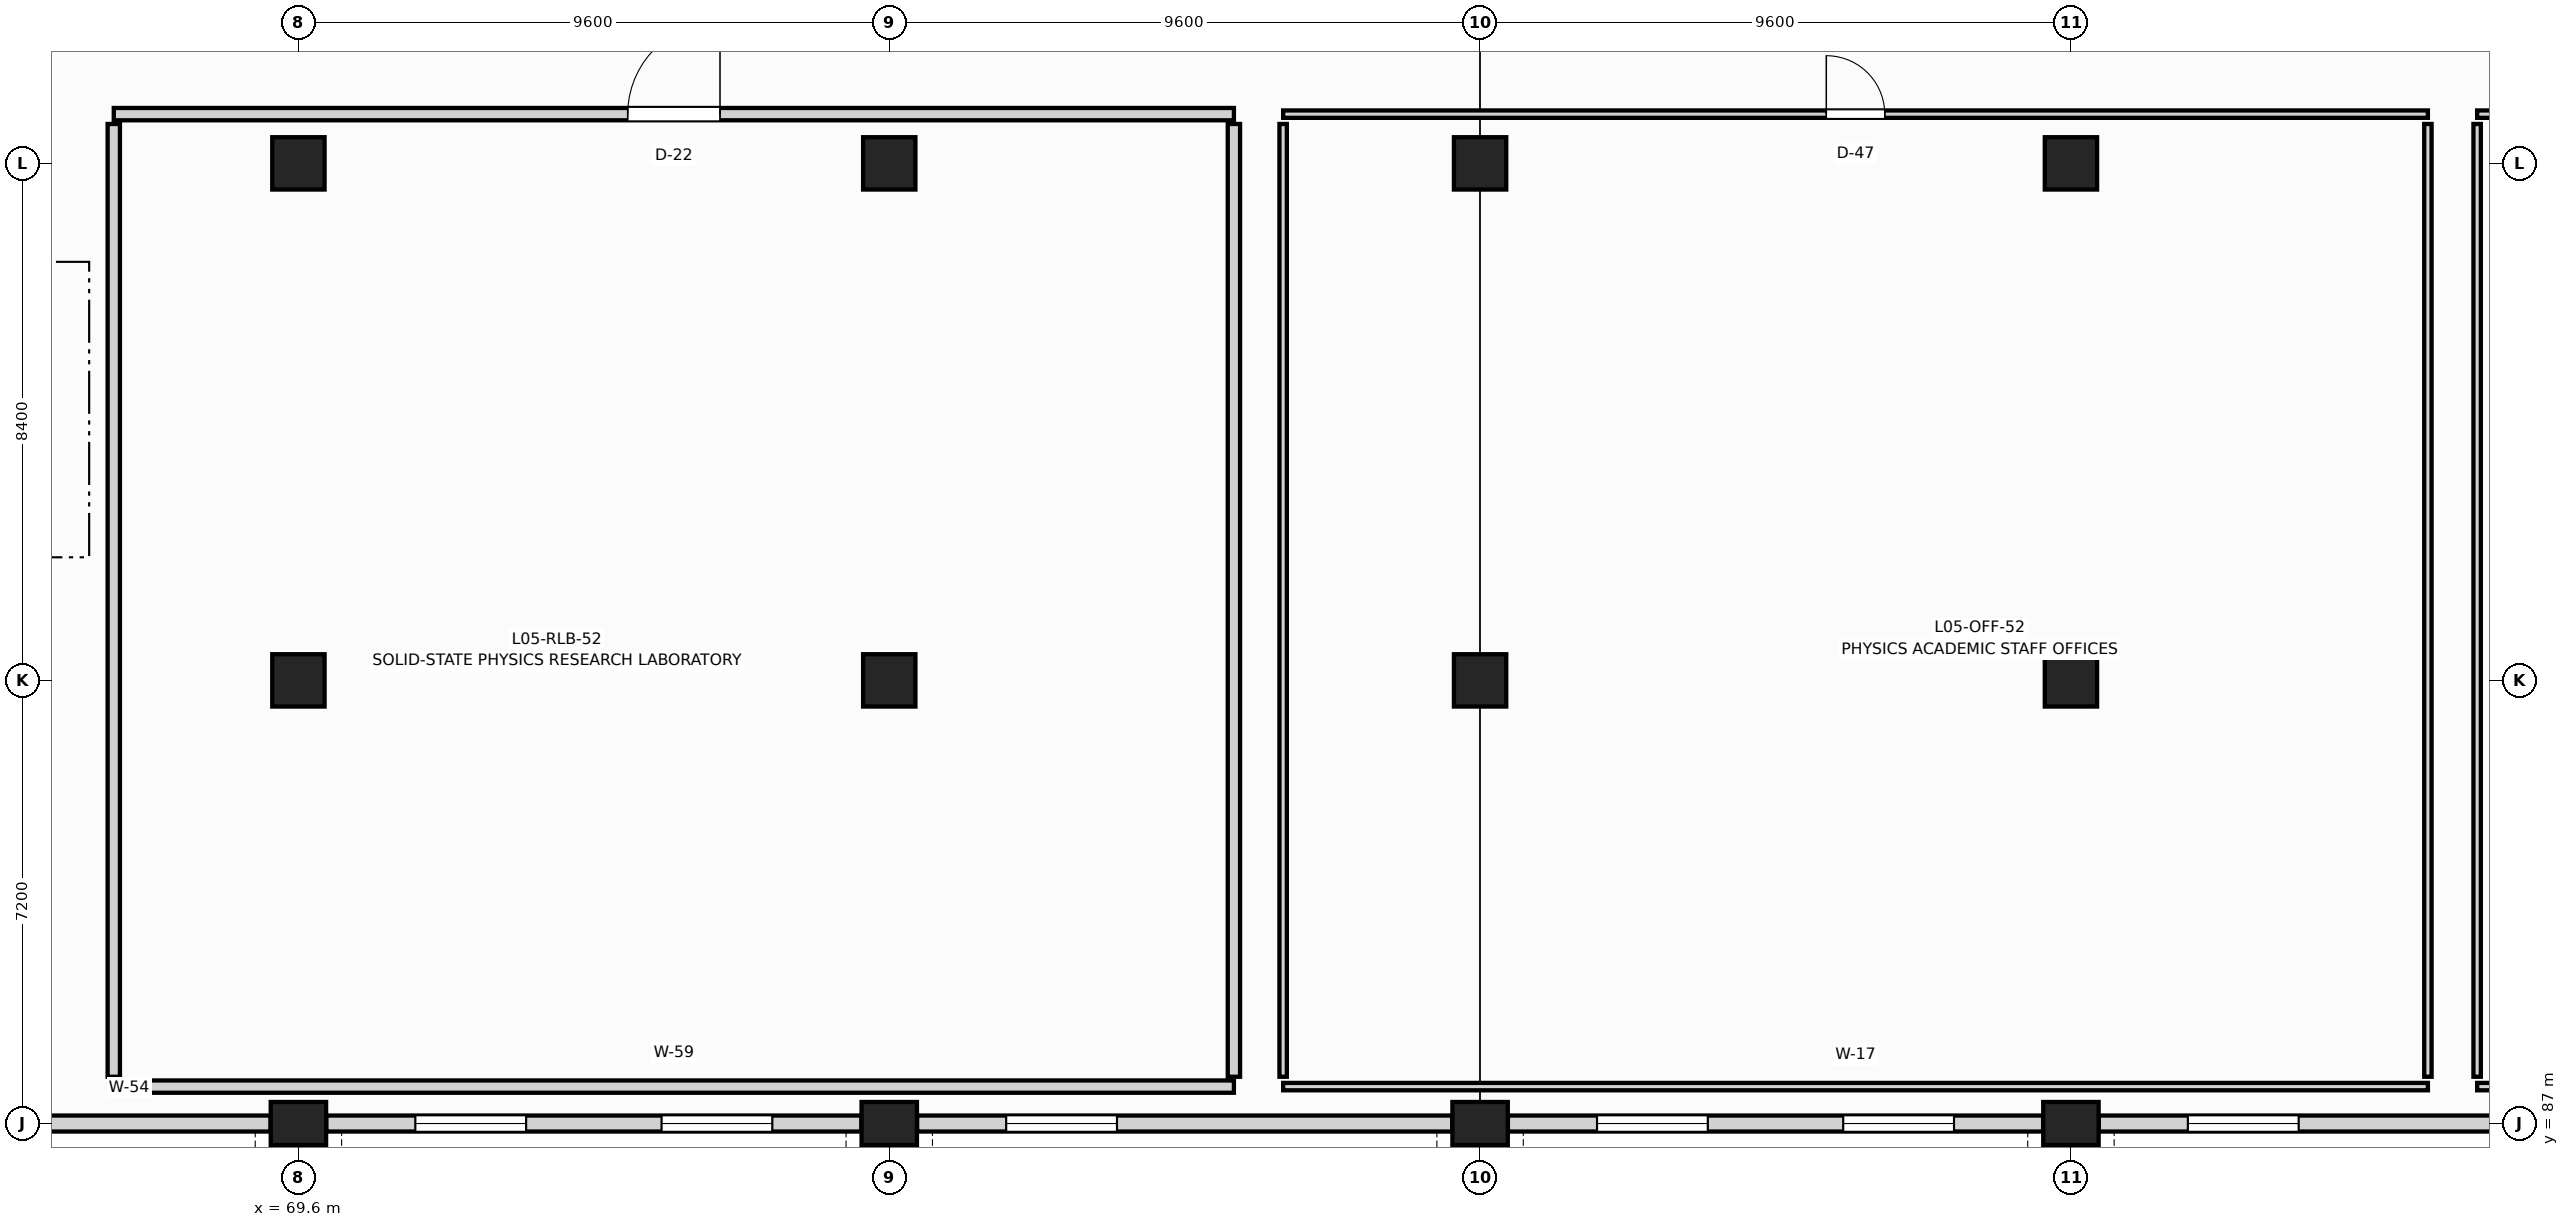
"""IFC4 building model, lengths in metres.
Left out: names, types, materials, properties, quantities, classifications, styles, units other than length and angle.
Written with IfcOpenShell. Run it as: python <this file> out.ifc"""

import sys

from ifc_helpers import new_model, si_unit, direction, frame, frame_2d, origin, origin_2d, place, context, subcontext, project, spatial, rectangle, extrude, element, fill, save


model = new_model("IFC4")
c1 = context("Model", 3, precision=1e-05, world=origin(), true_north=direction((0.0, 1.0)))
c2 = subcontext(c1, "Body", "Model", "MODEL_VIEW")
j1 = project(units=[si_unit("LENGTHUNIT", "METRE"), si_unit("PLANEANGLEUNIT", "RADIAN")], contexts=[c1])
p1 = place(None, origin())
s1 = spatial("IfcSite", under=j1, at=p1, CompositionType="ELEMENT")
p2 = place(p1, origin())
s2 = spatial("IfcBuilding", under=s1, at=p2, CompositionType="ELEMENT")
p3 = place(p2, frame((0.0, 0.0, 22.5)))
s3 = spatial("IfcBuildingStorey", under=s2, at=p3, CompositionType="ELEMENT", Elevation=22.5)
p4 = place(p3, frame((69.6, 87.0, 0.0), z_axis=(0.0, 0.0, 1.0), x_axis=(1.0, 0.0, 0.0)))
e1 = element("IfcColumn", 1, at=p4, inside=s3, PredefinedType="COLUMN", context=c2, shape_type="SweptSolid", body=[
    extrude(rectangle(XDim=0.9, YDim=0.7, at=origin_2d()), origin(), (0.0, 0.0, 1.0), 3.96),
])
for number, where, z_axis, x_axis in (
    (2, (69.6, 94.2, 0.0), (0.0, 0.0, 1.0), (1.0, 0.0, 0.0)),
    (3, (69.6, 102.6, 0.0), (0.0, 0.0, 1.0), (1.0, 0.0, 0.0)),
):
    element("IfcColumn", number, at=place(p3, frame(where, z_axis=z_axis, x_axis=x_axis)), inside=s3, PredefinedType="COLUMN", context=c2, shape_type="SweptSolid", body=[
        extrude(rectangle(XDim=0.85, YDim=0.85, at=origin_2d()), origin(), (0.0, 0.0, 1.0), 3.92),
    ])
p5 = place(p3, frame((79.2, 87.0, 0.0), z_axis=(0.0, 0.0, 1.0), x_axis=(1.0, 0.0, 0.0)))
e4 = element("IfcColumn", 4, at=p5, inside=s3, PredefinedType="COLUMN", context=c2, shape_type="SweptSolid", body=[
    extrude(rectangle(XDim=0.9, YDim=0.7, at=origin_2d()), origin(), (0.0, 0.0, 1.0), 3.96),
])
for number, where, z_axis, x_axis in (
    (5, (79.2, 94.2, 0.0), (0.0, 0.0, 1.0), (1.0, 0.0, 0.0)),
    (6, (79.2, 102.6, 0.0), (0.0, 0.0, 1.0), (1.0, 0.0, 0.0)),
):
    element("IfcColumn", number, at=place(p3, frame(where, z_axis=z_axis, x_axis=x_axis)), inside=s3, PredefinedType="COLUMN", context=c2, shape_type="SweptSolid", body=[
        extrude(rectangle(XDim=0.85, YDim=0.85, at=origin_2d()), origin(), (0.0, 0.0, 1.0), 3.92),
    ])
p6 = place(p3, frame((88.8, 87.0, 0.0), z_axis=(0.0, 0.0, 1.0), x_axis=(1.0, 0.0, 0.0)))
e7 = element("IfcColumn", 7, at=p6, inside=s3, PredefinedType="COLUMN", context=c2, shape_type="SweptSolid", body=[
    extrude(rectangle(XDim=0.9, YDim=0.7, at=origin_2d()), origin(), (0.0, 0.0, 1.0), 3.96),
])
for number, where, z_axis, x_axis in (
    (8, (88.8, 94.2, 0.0), (0.0, 0.0, 1.0), (1.0, 0.0, 0.0)),
    (9, (88.8, 102.6, 0.0), (0.0, 0.0, 1.0), (1.0, 0.0, 0.0)),
):
    element("IfcColumn", number, at=place(p3, frame(where, z_axis=z_axis, x_axis=x_axis)), inside=s3, PredefinedType="COLUMN", context=c2, shape_type="SweptSolid", body=[
        extrude(rectangle(XDim=0.85, YDim=0.85, at=origin_2d()), origin(), (0.0, 0.0, 1.0), 3.92),
    ])
p7 = place(p3, frame((98.4, 87.0, 0.0), z_axis=(0.0, 0.0, 1.0), x_axis=(1.0, 0.0, 0.0)))
e10 = element("IfcColumn", 10, at=p7, inside=s3, PredefinedType="COLUMN", context=c2, shape_type="SweptSolid", body=[
    extrude(rectangle(XDim=0.9, YDim=0.7, at=origin_2d()), origin(), (0.0, 0.0, 1.0), 3.96),
])
for number, where, z_axis, x_axis in (
    (11, (98.4, 94.2, 0.0), (0.0, 0.0, 1.0), (1.0, 0.0, 0.0)),
    (12, (98.4, 102.6, 0.0), (0.0, 0.0, 1.0), (1.0, 0.0, 0.0)),
):
    element("IfcColumn", number, at=place(p3, frame(where, z_axis=z_axis, x_axis=x_axis)), inside=s3, PredefinedType="COLUMN", context=c2, shape_type="SweptSolid", body=[
        extrude(rectangle(XDim=0.85, YDim=0.85, at=origin_2d()), origin(), (0.0, 0.0, 1.0), 3.92),
    ])
p8 = place(p3, frame((60.452, 87.0, 0.0), z_axis=(0.0, 0.0, 1.0), x_axis=(1.0, 0.0, 0.0)))
e13 = element("IfcWall", 13, at=p8, inside=s3, PredefinedType="SOLIDWALL", context=c2, shape_type="SweptSolid", body=[
    extrude(rectangle(XDim=8.696, YDim=0.26, at=frame_2d((4.348, 0.0))), origin(), (0.0, 0.0, 1.0), 3.08),
])
p9 = place(p8, frame((1.448, 0.0, 0.85)))
e14 = element("IfcOpeningElement", 14, at=p9, cuts=e13, PredefinedType="OPENING", context=c2, shape_type="SweptSolid", body=[
    extrude(rectangle(XDim=1.8, YDim=1.9, at=frame_2d((0.9, 0.95))), frame((0.0, 0.14, 0.0), z_axis=(0.0, -1.0, 0.0), x_axis=(1.0, 0.0, 0.0)), (0.0, 0.0, 1.0), 0.28),
])
p10 = place(p3, frame((70.052, 87.0, 0.0), z_axis=(0.0, 0.0, 1.0), x_axis=(1.0, 0.0, 0.0)))
e15 = element("IfcWall", 15, at=p10, inside=s3, PredefinedType="SOLIDWALL", context=c2, shape_type="SweptSolid", body=[
    extrude(rectangle(XDim=8.696, YDim=0.26, at=frame_2d((4.348, 0.0))), origin(), (0.0, 0.0, 1.0), 3.08),
])
p11 = place(p10, frame((1.448, 0.0, 0.85)))
e16 = element("IfcOpeningElement", 16, at=p11, cuts=e15, PredefinedType="OPENING", context=c2, shape_type="SweptSolid", body=[
    extrude(rectangle(XDim=1.8, YDim=1.9, at=frame_2d((0.9, 0.95))), frame((0.0, 0.14, 0.0), z_axis=(0.0, -1.0, 0.0), x_axis=(1.0, 0.0, 0.0)), (0.0, 0.0, 1.0), 0.28),
])
p12 = place(p10, frame((5.448, 0.0, 0.85)))
e17 = element("IfcOpeningElement", 17, at=p12, cuts=e15, PredefinedType="OPENING", context=c2, shape_type="SweptSolid", body=[
    extrude(rectangle(XDim=1.8, YDim=1.9, at=frame_2d((0.9, 0.95))), frame((0.0, 0.14, 0.0), z_axis=(0.0, -1.0, 0.0), x_axis=(1.0, 0.0, 0.0)), (0.0, 0.0, 1.0), 0.28),
])
p13 = place(p3, frame((79.652, 87.0, 0.0), z_axis=(0.0, 0.0, 1.0), x_axis=(1.0, 0.0, 0.0)))
e18 = element("IfcWall", 18, at=p13, inside=s3, PredefinedType="SOLIDWALL", context=c2, shape_type="SweptSolid", body=[
    extrude(rectangle(XDim=8.696, YDim=0.26, at=frame_2d((4.348, 0.0))), origin(), (0.0, 0.0, 1.0), 3.08),
])
p14 = place(p13, frame((1.448, 0.0, 0.85)))
e19 = element("IfcOpeningElement", 19, at=p14, cuts=e18, PredefinedType="OPENING", context=c2, shape_type="SweptSolid", body=[
    extrude(rectangle(XDim=1.8, YDim=1.9, at=frame_2d((0.9, 0.95))), frame((0.0, 0.14, 0.0), z_axis=(0.0, -1.0, 0.0), x_axis=(1.0, 0.0, 0.0)), (0.0, 0.0, 1.0), 0.28),
])
p15 = place(p3, frame((89.252, 87.0, 0.0), z_axis=(0.0, 0.0, 1.0), x_axis=(1.0, 0.0, 0.0)))
e20 = element("IfcWall", 20, at=p15, inside=s3, PredefinedType="SOLIDWALL", context=c2, shape_type="SweptSolid", body=[
    extrude(rectangle(XDim=8.696, YDim=0.26, at=frame_2d((4.348, 0.0))), origin(), (0.0, 0.0, 1.0), 3.08),
])
p16 = place(p15, frame((1.448, 0.0, 0.85)))
e21 = element("IfcOpeningElement", 21, at=p16, cuts=e20, PredefinedType="OPENING", context=c2, shape_type="SweptSolid", body=[
    extrude(rectangle(XDim=1.8, YDim=1.9, at=frame_2d((0.9, 0.95))), frame((0.0, 0.14, 0.0), z_axis=(0.0, -1.0, 0.0), x_axis=(1.0, 0.0, 0.0)), (0.0, 0.0, 1.0), 0.28),
])
p17 = place(p15, frame((5.448, 0.0, 0.85)))
e22 = element("IfcOpeningElement", 22, at=p17, cuts=e20, PredefinedType="OPENING", context=c2, shape_type="SweptSolid", body=[
    extrude(rectangle(XDim=1.8, YDim=1.9, at=frame_2d((0.9, 0.95))), frame((0.0, 0.14, 0.0), z_axis=(0.0, -1.0, 0.0), x_axis=(1.0, 0.0, 0.0)), (0.0, 0.0, 1.0), 0.28),
])
p18 = place(p3, frame((98.852, 87.0, 0.0), z_axis=(0.0, 0.0, 1.0), x_axis=(1.0, 0.0, 0.0)))
e23 = element("IfcWall", 23, at=p18, inside=s3, PredefinedType="SOLIDWALL", context=c2, shape_type="SweptSolid", body=[
    extrude(rectangle(XDim=8.696, YDim=0.26, at=frame_2d((4.348, 0.0))), origin(), (0.0, 0.0, 1.0), 3.08),
])
p19 = place(p18, frame((1.448, 0.0, 0.85)))
e24 = element("IfcOpeningElement", 24, at=p19, cuts=e23, PredefinedType="OPENING", context=c2, shape_type="SweptSolid", body=[
    extrude(rectangle(XDim=1.8, YDim=1.9, at=frame_2d((0.9, 0.95))), frame((0.0, 0.14, 0.0), z_axis=(0.0, -1.0, 0.0), x_axis=(1.0, 0.0, 0.0)), (0.0, 0.0, 1.0), 0.28),
])
p20 = place(p3, frame((66.6, 87.6, 0.0), z_axis=(0.0, 0.0, 1.0), x_axis=(1.0, 0.0, 0.0)))
e25 = element("IfcWall", 25, at=p20, inside=s3, PredefinedType="PARTITIONING", context=c2, shape_type="SweptSolid", body=[
    extrude(rectangle(XDim=18.2, YDim=0.2, at=frame_2d((9.1, 0.0))), origin(), (0.0, 0.0, 1.0), 3.15),
])
p21 = place(p3, frame((66.6, 103.4, 0.0), z_axis=(0.0, 0.0, 1.0), x_axis=(1.0, 0.0, 0.0)))
e26 = element("IfcWall", 26, at=p21, inside=s3, PredefinedType="PARTITIONING", context=c2, shape_type="SweptSolid", body=[
    extrude(rectangle(XDim=18.2, YDim=0.2, at=frame_2d((9.1, 0.0))), origin(), (0.0, 0.0, 1.0), 3.15),
])
p22 = place(p21, frame((8.35, 0.0, 0.0)))
e27 = element("IfcOpeningElement", 27, at=p22, cuts=e26, PredefinedType="OPENING", context=c2, shape_type="SweptSolid", body=[
    extrude(rectangle(XDim=1.5, YDim=2.2, at=frame_2d((0.75, 1.1))), frame((0.0, 0.11, 0.0), z_axis=(0.0, -1.0, 0.0), x_axis=(1.0, 0.0, 0.0)), (0.0, 0.0, 1.0), 0.22),
])
for number, where, z_axis, x_axis in (
    (28, (66.6, 87.76, 0.0), (0.0, 0.0, 1.0), (0.0, 1.0, 0.0)),
    (29, (84.8, 87.76, 0.0), (0.0, 0.0, 1.0), (0.0, 1.0, 0.0)),
):
    element("IfcWall", number, at=place(p3, frame(where, z_axis=z_axis, x_axis=x_axis)), inside=s3, PredefinedType="PARTITIONING", context=c2, shape_type="SweptSolid", body=[
        extrude(rectangle(XDim=15.48, YDim=0.2, at=frame_2d((7.74, 0.0))), origin(), (0.0, 0.0, 1.0), 3.15),
    ])
p23 = place(p3, frame((85.6, 87.6, 0.0), z_axis=(0.0, 0.0, 1.0), x_axis=(1.0, 0.0, 0.0)))
e30 = element("IfcWall", 30, at=p23, inside=s3, PredefinedType="PARTITIONING", context=c2, shape_type="SweptSolid", body=[
    extrude(rectangle(XDim=18.6, YDim=0.12, at=frame_2d((9.3, 0.0))), origin(), (0.0, 0.0, 1.0), 3.15),
])
p24 = place(p3, frame((85.6, 103.4, 0.0), z_axis=(0.0, 0.0, 1.0), x_axis=(1.0, 0.0, 0.0)))
e31 = element("IfcWall", 31, at=p24, inside=s3, PredefinedType="PARTITIONING", context=c2, shape_type="SweptSolid", body=[
    extrude(rectangle(XDim=18.6, YDim=0.12, at=frame_2d((9.3, 0.0))), origin(), (0.0, 0.0, 1.0), 3.15),
])
p25 = place(p24, frame((8.825, 0.0, 0.0)))
e32 = element("IfcOpeningElement", 32, at=p25, cuts=e31, PredefinedType="OPENING", context=c2, shape_type="SweptSolid", body=[
    extrude(rectangle(XDim=0.95, YDim=2.15, at=frame_2d((0.475, 1.075))), frame((0.0, 0.07, 0.0), z_axis=(0.0, -1.0, 0.0), x_axis=(1.0, 0.0, 0.0)), (0.0, 0.0, 1.0), 0.14),
])
for number, where, z_axis, x_axis in (
    (33, (85.6, 87.76, 0.0), (0.0, 0.0, 1.0), (0.0, 1.0, 0.0)),
    (34, (104.2, 87.76, 0.0), (0.0, 0.0, 1.0), (0.0, 1.0, 0.0)),
):
    element("IfcWall", number, at=place(p3, frame(where, z_axis=z_axis, x_axis=x_axis)), inside=s3, PredefinedType="PARTITIONING", context=c2, shape_type="SweptSolid", body=[
        extrude(rectangle(XDim=15.48, YDim=0.12, at=frame_2d((7.74, 0.0))), origin(), (0.0, 0.0, 1.0), 3.15),
    ])
p26 = place(p3, frame((105.0, 87.6, 0.0), z_axis=(0.0, 0.0, 1.0), x_axis=(1.0, 0.0, 0.0)))
e35 = element("IfcWall", 35, at=p26, inside=s3, PredefinedType="PARTITIONING", context=c2, shape_type="SweptSolid", body=[
    extrude(rectangle(XDim=11.8, YDim=0.12, at=frame_2d((5.9, 0.0))), origin(), (0.0, 0.0, 1.0), 3.15),
])
p27 = place(p3, frame((105.0, 103.4, 0.0), z_axis=(0.0, 0.0, 1.0), x_axis=(1.0, 0.0, 0.0)))
e36 = element("IfcWall", 36, at=p27, inside=s3, PredefinedType="PARTITIONING", context=c2, shape_type="SweptSolid", body=[
    extrude(rectangle(XDim=11.8, YDim=0.12, at=frame_2d((5.9, 0.0))), origin(), (0.0, 0.0, 1.0), 3.15),
])
p28 = place(p27, frame((5.425, 0.0, 0.0)))
e37 = element("IfcOpeningElement", 37, at=p28, cuts=e36, PredefinedType="OPENING", context=c2, shape_type="SweptSolid", body=[
    extrude(rectangle(XDim=0.95, YDim=2.15, at=frame_2d((0.475, 1.075))), frame((0.0, 0.07, 0.0), z_axis=(0.0, -1.0, 0.0), x_axis=(1.0, 0.0, 0.0)), (0.0, 0.0, 1.0), 0.14),
])
p29 = place(p3, frame((105.0, 87.76, 0.0), z_axis=(0.0, 0.0, 1.0), x_axis=(0.0, 1.0, 0.0)))
e38 = element("IfcWall", 38, at=p29, inside=s3, PredefinedType="PARTITIONING", context=c2, shape_type="SweptSolid", body=[
    extrude(rectangle(XDim=15.48, YDim=0.12, at=frame_2d((7.74, 0.0))), origin(), (0.0, 0.0, 1.0), 3.15),
])
p30 = place(p11, origin())
e39 = element("IfcWindow", 39, at=p30, inside=s3, PartitioningType="SINGLE_PANEL", PredefinedType="WINDOW", context=c2, shape_type="SweptSolid", body=[
    extrude(rectangle(XDim=1.8, YDim=1.9, at=frame_2d((0.9, 0.95))), frame((0.0, 0.03, 0.0), z_axis=(0.0, -1.0, 0.0), x_axis=(1.0, 0.0, 0.0)), (0.0, 0.0, 1.0), 0.06),
])
fill(e16, e39)
p31 = place(p12, origin())
e40 = element("IfcWindow", 40, at=p31, inside=s3, PartitioningType="SINGLE_PANEL", PredefinedType="WINDOW", context=c2, shape_type="SweptSolid", body=[
    extrude(rectangle(XDim=1.8, YDim=1.9, at=frame_2d((0.9, 0.95))), frame((0.0, 0.03, 0.0), z_axis=(0.0, -1.0, 0.0), x_axis=(1.0, 0.0, 0.0)), (0.0, 0.0, 1.0), 0.06),
])
fill(e17, e40)
p32 = place(p14, origin())
e41 = element("IfcWindow", 41, at=p32, inside=s3, PartitioningType="SINGLE_PANEL", PredefinedType="WINDOW", context=c2, shape_type="SweptSolid", body=[
    extrude(rectangle(XDim=1.8, YDim=1.9, at=frame_2d((0.9, 0.95))), frame((0.0, 0.03, 0.0), z_axis=(0.0, -1.0, 0.0), x_axis=(1.0, 0.0, 0.0)), (0.0, 0.0, 1.0), 0.06),
])
fill(e19, e41)
p33 = place(p16, origin())
e42 = element("IfcWindow", 42, at=p33, inside=s3, PartitioningType="SINGLE_PANEL", PredefinedType="WINDOW", context=c2, shape_type="SweptSolid", body=[
    extrude(rectangle(XDim=1.8, YDim=1.9, at=frame_2d((0.9, 0.95))), frame((0.0, 0.03, 0.0), z_axis=(0.0, -1.0, 0.0), x_axis=(1.0, 0.0, 0.0)), (0.0, 0.0, 1.0), 0.06),
])
fill(e21, e42)
p34 = place(p17, origin())
e43 = element("IfcWindow", 43, at=p34, inside=s3, PartitioningType="SINGLE_PANEL", PredefinedType="WINDOW", context=c2, shape_type="SweptSolid", body=[
    extrude(rectangle(XDim=1.8, YDim=1.9, at=frame_2d((0.9, 0.95))), frame((0.0, 0.03, 0.0), z_axis=(0.0, -1.0, 0.0), x_axis=(1.0, 0.0, 0.0)), (0.0, 0.0, 1.0), 0.06),
])
fill(e22, e43)
p35 = place(p19, origin())
e44 = element("IfcWindow", 44, at=p35, inside=s3, PartitioningType="SINGLE_PANEL", PredefinedType="WINDOW", context=c2, shape_type="SweptSolid", body=[
    extrude(rectangle(XDim=1.8, YDim=1.9, at=frame_2d((0.9, 0.95))), frame((0.0, 0.03, 0.0), z_axis=(0.0, -1.0, 0.0), x_axis=(1.0, 0.0, 0.0)), (0.0, 0.0, 1.0), 0.06),
])
fill(e24, e44)
p36 = place(p22, origin())
e45 = element("IfcDoor", 45, at=p36, inside=s3, OperationType="SINGLE_SWING_RIGHT", PredefinedType="DOOR", context=c2, shape_type="SweptSolid", body=[
    extrude(rectangle(XDim=1.5, YDim=2.2, at=frame_2d((0.75, 1.1))), frame((0.0, 0.025, 0.0), z_axis=(0.0, -1.0, 0.0), x_axis=(1.0, 0.0, 0.0)), (0.0, 0.0, 1.0), 0.05),
])
fill(e27, e45)
p37 = place(p25, origin())
e46 = element("IfcDoor", 46, at=p37, inside=s3, OperationType="SINGLE_SWING_LEFT", PredefinedType="DOOR", context=c2, shape_type="SweptSolid", body=[
    extrude(rectangle(XDim=0.95, YDim=2.15, at=frame_2d((0.475, 1.075))), frame((0.0, 0.025, 0.0), z_axis=(0.0, -1.0, 0.0), x_axis=(1.0, 0.0, 0.0)), (0.0, 0.0, 1.0), 0.05),
])
fill(e32, e46)
save(model, sys.argv[1])
